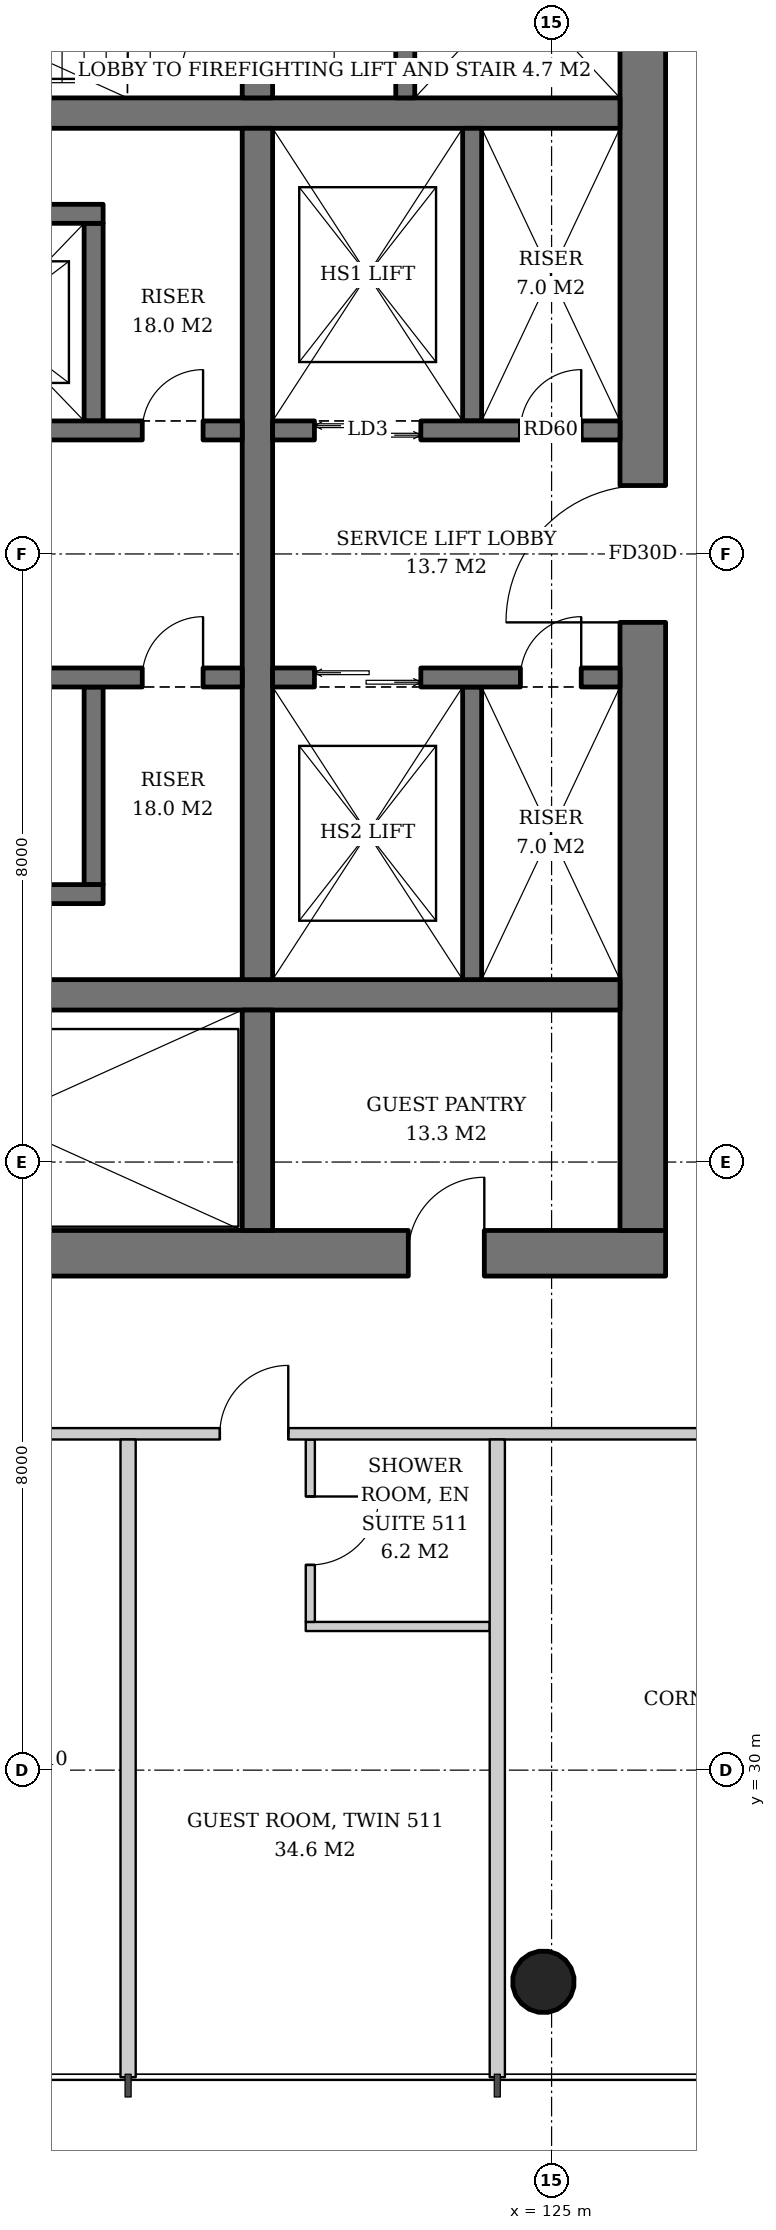
"""IFC4 building model, lengths in metres.
Left out: names, types, materials, properties, quantities, classifications, styles, units other than length and angle.
Written with IfcOpenShell. Run it as: python <this file> out.ifc"""

import sys

from ifc_helpers import new_model, si_unit, direction, frame, frame_2d, origin, origin_2d, place, context, subcontext, project, spatial, rectangle, hollow_circle, extrude, element, fill, save


model = new_model("IFC4")
c1 = context("Model", 3, precision=1e-05, world=origin(), true_north=direction((0.0, 1.0)))
c2 = subcontext(c1, "Body", "Model", "MODEL_VIEW")
j1 = project(units=[si_unit("LENGTHUNIT", "METRE"), si_unit("PLANEANGLEUNIT", "RADIAN")], contexts=[c1])
p1 = place(None, origin())
s1 = spatial("IfcSite", under=j1, at=p1, CompositionType="ELEMENT")
p2 = place(p1, origin())
s2 = spatial("IfcBuilding", under=s1, at=p2, CompositionType="ELEMENT")
p3 = place(p2, frame((0.0, 0.0, 24.8)))
s3 = spatial("IfcBuildingStorey", under=s2, at=p3, CompositionType="ELEMENT", Elevation=24.8)
p4 = place(p3, frame((124.918, 27.164, 0.0), z_axis=(-0.021561848751, 0.043059525333, 0.998839808957), x_axis=(-0.894160516368, -0.44774654769, 0.0)))
e1 = element("IfcColumn", 1, at=p4, inside=s3, PredefinedType="COLUMN", context=c2, shape_type="SweptSolid", body=[
    extrude(hollow_circle(Radius=0.406, WallThickness=0.03, at=origin_2d()), origin(), (0.0, 0.0, 1.0), 3.804),
])
p5 = place(p3, frame((107.5, 36.8, 0.0), z_axis=(0.0, 0.0, 1.0), x_axis=(1.0, 0.0, 0.0)))
e2 = element("IfcWall", 2, at=p5, inside=s3, PredefinedType="SHEAR", context=c2, shape_type="SweptSolid", body=[
    extrude(rectangle(XDim=19.0, YDim=0.6, at=frame_2d((9.5, 0.0))), origin(), (0.0, 0.0, 1.0), 3.8),
])
p6 = place(p5, frame((3.9, 0.0, 0.0)))
e3 = element("IfcOpeningElement", 3, at=p6, cuts=e2, PredefinedType="OPENING", context=c2, shape_type="SweptSolid", body=[
    extrude(rectangle(XDim=1.0, YDim=2.1, at=frame_2d((0.5, 1.05))), frame((0.0, 0.31, 0.0), z_axis=(0.0, -1.0, 0.0), x_axis=(1.0, 0.0, 0.0)), (0.0, 0.0, 1.0), 0.62),
])
p7 = place(p5, frame((15.615, 0.0, 0.0)))
e4 = element("IfcOpeningElement", 4, at=p7, cuts=e2, PredefinedType="OPENING", context=c2, shape_type="SweptSolid", body=[
    extrude(rectangle(XDim=1.0, YDim=2.1, at=frame_2d((0.5, 1.05))), frame((0.0, 0.31, 0.0), z_axis=(0.0, -1.0, 0.0), x_axis=(1.0, 0.0, 0.0)), (0.0, 0.0, 1.0), 0.62),
])
p8 = place(p3, frame((126.2, 37.1, 0.0), z_axis=(0.0, 0.0, 1.0), x_axis=(0.0, 1.0, 0.0)))
e5 = element("IfcWall", 5, at=p8, inside=s3, PredefinedType="SHEAR", context=c2, shape_type="SweptSolid", body=[
    extrude(rectangle(XDim=17.8, YDim=0.6, at=frame_2d((8.9, 0.0))), origin(), (0.0, 0.0, 1.0), 3.8),
])
p9 = place(p8, frame((8.0, 0.0, 0.0)))
e6 = element("IfcOpeningElement", 6, at=p9, cuts=e5, PredefinedType="OPENING", context=c2, shape_type="SweptSolid", body=[
    extrude(rectangle(XDim=1.8, YDim=2.4, at=frame_2d((0.9, 1.2))), frame((0.0, 0.31, 0.0), z_axis=(0.0, -1.0, 0.0), x_axis=(1.0, 0.0, 0.0)), (0.0, 0.0, 1.0), 0.62),
])
for number, where, z_axis, x_axis in (
    (7, (108.1, 40.2, 0.0), (0.0, 0.0, 1.0), (1.0, 0.0, 0.0)),
    (8, (108.1, 51.8, 0.0), (0.0, 0.0, 1.0), (1.0, 0.0, 0.0)),
):
    element("IfcWall", number, at=place(p3, frame(where, z_axis=z_axis, x_axis=x_axis)), inside=s3, PredefinedType="SHEAR", context=c2, shape_type="SweptSolid", body=[
        extrude(rectangle(XDim=17.8, YDim=0.4, at=frame_2d((8.9, 0.0))), origin(), (0.0, 0.0, 1.0), 3.8),
    ])
p10 = place(p3, frame((121.13, 37.1, 0.0), z_axis=(0.0, 0.0, 1.0), x_axis=(0.0, 1.0, 0.0)))
e9 = element("IfcWall", 9, at=p10, inside=s3, PredefinedType="SHEAR", context=c2, shape_type="SweptSolid", body=[
    extrude(rectangle(XDim=2.9, YDim=0.4, at=frame_2d((1.45, 0.0))), origin(), (0.0, 0.0, 1.0), 3.8),
])
p11 = place(p3, frame((121.13, 40.4, 0.0), z_axis=(0.0, 0.0, 1.0), x_axis=(0.0, 1.0, 0.0)))
e10 = element("IfcWall", 10, at=p11, inside=s3, PredefinedType="SHEAR", context=c2, shape_type="SweptSolid", body=[
    extrude(rectangle(XDim=11.2, YDim=0.4, at=frame_2d((5.6, 0.0))), origin(), (0.0, 0.0, 1.0), 3.8),
])
p12 = place(p3, frame((121.13, 52.0, 0.0), z_axis=(0.0, 0.0, 1.0), x_axis=(0.0, 1.0, 0.0)))
e11 = element("IfcWall", 11, at=p12, inside=s3, PredefinedType="SHEAR", context=c2, shape_type="SweptSolid", body=[
    extrude(rectangle(XDim=2.9, YDim=0.4, at=frame_2d((1.45, 0.0))), origin(), (0.0, 0.0, 1.0), 3.8),
])
p13 = place(p12, frame((0.3, 0.0, 0.0)))
e12 = element("IfcOpeningElement", 12, at=p13, cuts=e11, PredefinedType="OPENING", context=c2, shape_type="SweptSolid", body=[
    extrude(rectangle(XDim=1.0, YDim=2.1, at=frame_2d((0.5, 1.05))), frame((0.0, 0.21, 0.0), z_axis=(0.0, -1.0, 0.0), x_axis=(1.0, 0.0, 0.0)), (0.0, 0.0, 1.0), 0.42),
])
p14 = place(p3, frame((123.075, 52.0, 0.0), z_axis=(0.0, 0.0, 1.0), x_axis=(0.0, 1.0, 0.0)))
e13 = element("IfcWall", 13, at=p14, inside=s3, PredefinedType="SHEAR", context=c2, shape_type="SweptSolid", body=[
    extrude(rectangle(XDim=2.9, YDim=0.25, at=frame_2d((1.45, 0.0))), origin(), (0.0, 0.0, 1.0), 3.8),
])
p15 = place(p14, frame((0.8, 0.0, 0.0)))
e14 = element("IfcOpeningElement", 14, at=p15, cuts=e13, PredefinedType="OPENING", context=c2, shape_type="SweptSolid", body=[
    extrude(rectangle(XDim=1.3, YDim=2.2, at=frame_2d((0.65, 1.1))), frame((0.0, 0.135, 0.0), z_axis=(0.0, -1.0, 0.0), x_axis=(1.0, 0.0, 0.0)), (0.0, 0.0, 1.0), 0.27),
])
p16 = place(p3, frame((118.975, 47.75, 0.0), z_axis=(0.0, 0.0, 1.0), x_axis=(0.0, 1.0, 0.0)))
e15 = element("IfcWall", 15, at=p16, inside=s3, PredefinedType="SHEAR", context=c2, shape_type="SweptSolid", body=[
    extrude(rectangle(XDim=2.6, YDim=0.25, at=frame_2d((1.3, 0.0))), origin(), (0.0, 0.0, 1.0), 3.8),
])
p17 = place(p3, frame((108.1, 50.475, 0.0), z_axis=(0.0, 0.0, 1.0), x_axis=(1.0, 0.0, 0.0)))
e16 = element("IfcWall", 16, at=p17, inside=s3, PredefinedType="SHEAR", context=c2, shape_type="SweptSolid", body=[
    extrude(rectangle(XDim=11.0, YDim=0.25, at=frame_2d((5.5, 0.0))), origin(), (0.0, 0.0, 1.0), 3.8),
])
p18 = place(p3, frame((108.1, 47.625, 0.0), z_axis=(0.0, 0.0, 1.0), x_axis=(1.0, 0.0, 0.0)))
e17 = element("IfcWall", 17, at=p18, inside=s3, PredefinedType="SHEAR", context=c2, shape_type="SweptSolid", body=[
    extrude(rectangle(XDim=12.83, YDim=0.25, at=frame_2d((6.415, 0.0))), origin(), (0.0, 0.0, 1.0), 3.8),
])
p19 = place(p18, frame((0.7, 0.0, 0.0)))
e18 = element("IfcOpeningElement", 18, at=p19, cuts=e17, PredefinedType="OPENING", context=c2, shape_type="SweptSolid", body=[
    extrude(rectangle(XDim=1.1, YDim=2.2, at=frame_2d((0.55, 1.1))), frame((0.0, 0.135, 0.0), z_axis=(0.0, -1.0, 0.0), x_axis=(1.0, 0.0, 0.0)), (0.0, 0.0, 1.0), 0.27),
])
p20 = place(p18, frame((3.45, 0.0, 0.0)))
e19 = element("IfcOpeningElement", 19, at=p20, cuts=e17, PredefinedType="OPENING", context=c2, shape_type="SweptSolid", body=[
    extrude(rectangle(XDim=1.1, YDim=2.2, at=frame_2d((0.55, 1.1))), frame((0.0, 0.135, 0.0), z_axis=(0.0, -1.0, 0.0), x_axis=(1.0, 0.0, 0.0)), (0.0, 0.0, 1.0), 0.27),
])
p21 = place(p18, frame((6.2, 0.0, 0.0)))
e20 = element("IfcOpeningElement", 20, at=p21, cuts=e17, PredefinedType="OPENING", context=c2, shape_type="SweptSolid", body=[
    extrude(rectangle(XDim=1.1, YDim=2.2, at=frame_2d((0.55, 1.1))), frame((0.0, 0.135, 0.0), z_axis=(0.0, -1.0, 0.0), x_axis=(1.0, 0.0, 0.0)), (0.0, 0.0, 1.0), 0.27),
])
p22 = place(p18, frame((8.95, 0.0, 0.0)))
e21 = element("IfcOpeningElement", 21, at=p22, cuts=e17, PredefinedType="OPENING", context=c2, shape_type="SweptSolid", body=[
    extrude(rectangle(XDim=1.1, YDim=2.2, at=frame_2d((0.55, 1.1))), frame((0.0, 0.135, 0.0), z_axis=(0.0, -1.0, 0.0), x_axis=(1.0, 0.0, 0.0)), (0.0, 0.0, 1.0), 0.27),
])
p23 = place(p18, frame((11.515, 0.0, 0.0)))
e22 = element("IfcOpeningElement", 22, at=p23, cuts=e17, PredefinedType="OPENING", context=c2, shape_type="SweptSolid", body=[
    extrude(rectangle(XDim=0.8, YDim=2.0, at=frame_2d((0.4, 1.0))), frame((0.0, 0.135, 0.0), z_axis=(0.0, -1.0, 0.0), x_axis=(1.0, 0.0, 0.0)), (0.0, 0.0, 1.0), 0.27),
])
p24 = place(p3, frame((118.975, 44.25, 0.0), z_axis=(0.0, 0.0, 1.0), x_axis=(0.0, -1.0, 0.0)))
e23 = element("IfcWall", 23, at=p24, inside=s3, PredefinedType="SHEAR", context=c2, shape_type="SweptSolid", body=[
    extrude(rectangle(XDim=2.6, YDim=0.25, at=frame_2d((1.3, 0.0))), origin(), (0.0, 0.0, 1.0), 3.8),
])
p25 = place(p3, frame((108.1, 41.525, 0.0), z_axis=(0.0, 0.0, 1.0), x_axis=(1.0, 0.0, 0.0)))
e24 = element("IfcWall", 24, at=p25, inside=s3, PredefinedType="SHEAR", context=c2, shape_type="SweptSolid", body=[
    extrude(rectangle(XDim=11.0, YDim=0.25, at=frame_2d((5.5, 0.0))), origin(), (0.0, 0.0, 1.0), 3.8),
])
p26 = place(p3, frame((108.1, 44.375, 0.0), z_axis=(0.0, 0.0, 1.0), x_axis=(1.0, 0.0, 0.0)))
e25 = element("IfcWall", 25, at=p26, inside=s3, PredefinedType="SHEAR", context=c2, shape_type="SweptSolid", body=[
    extrude(rectangle(XDim=12.83, YDim=0.25, at=frame_2d((6.415, 0.0))), origin(), (0.0, 0.0, 1.0), 3.8),
])
p27 = place(p26, frame((0.7, 0.0, 0.0)))
e26 = element("IfcOpeningElement", 26, at=p27, cuts=e25, PredefinedType="OPENING", context=c2, shape_type="SweptSolid", body=[
    extrude(rectangle(XDim=1.1, YDim=2.2, at=frame_2d((0.55, 1.1))), frame((0.0, 0.135, 0.0), z_axis=(0.0, -1.0, 0.0), x_axis=(1.0, 0.0, 0.0)), (0.0, 0.0, 1.0), 0.27),
])
p28 = place(p26, frame((3.45, 0.0, 0.0)))
e27 = element("IfcOpeningElement", 27, at=p28, cuts=e25, PredefinedType="OPENING", context=c2, shape_type="SweptSolid", body=[
    extrude(rectangle(XDim=1.1, YDim=2.2, at=frame_2d((0.55, 1.1))), frame((0.0, 0.135, 0.0), z_axis=(0.0, -1.0, 0.0), x_axis=(1.0, 0.0, 0.0)), (0.0, 0.0, 1.0), 0.27),
])
p29 = place(p26, frame((6.2, 0.0, 0.0)))
e28 = element("IfcOpeningElement", 28, at=p29, cuts=e25, PredefinedType="OPENING", context=c2, shape_type="SweptSolid", body=[
    extrude(rectangle(XDim=1.1, YDim=2.2, at=frame_2d((0.55, 1.1))), frame((0.0, 0.135, 0.0), z_axis=(0.0, -1.0, 0.0), x_axis=(1.0, 0.0, 0.0)), (0.0, 0.0, 1.0), 0.27),
])
p30 = place(p26, frame((9.0, 0.0, 0.0)))
e29 = element("IfcOpeningElement", 29, at=p30, cuts=e25, PredefinedType="OPENING", context=c2, shape_type="SweptSolid", body=[
    extrude(rectangle(XDim=1.0, YDim=2.1, at=frame_2d((0.5, 1.05))), frame((0.0, 0.135, 0.0), z_axis=(0.0, -1.0, 0.0), x_axis=(1.0, 0.0, 0.0)), (0.0, 0.0, 1.0), 0.27),
])
p31 = place(p26, frame((11.515, 0.0, 0.0)))
e30 = element("IfcOpeningElement", 30, at=p31, cuts=e25, PredefinedType="OPENING", context=c2, shape_type="SweptSolid", body=[
    extrude(rectangle(XDim=0.8, YDim=2.0, at=frame_2d((0.4, 1.0))), frame((0.0, 0.135, 0.0), z_axis=(0.0, -1.0, 0.0), x_axis=(1.0, 0.0, 0.0)), (0.0, 0.0, 1.0), 0.27),
])
p32 = place(p3, frame((123.955, 47.75, 0.0), z_axis=(0.0, 0.0, 1.0), x_axis=(0.0, 1.0, 0.0)))
e31 = element("IfcWall", 31, at=p32, inside=s3, PredefinedType="SHEAR", context=c2, shape_type="SweptSolid", body=[
    extrude(rectangle(XDim=3.85, YDim=0.25, at=frame_2d((1.925, 0.0))), origin(), (0.0, 0.0, 1.0), 3.8),
])
p33 = place(p3, frame((121.33, 47.625, 0.0), z_axis=(0.0, 0.0, 1.0), x_axis=(1.0, 0.0, 0.0)))
e32 = element("IfcWall", 32, at=p33, inside=s3, PredefinedType="SHEAR", context=c2, shape_type="SweptSolid", body=[
    extrude(rectangle(XDim=4.57, YDim=0.25, at=frame_2d((2.285, 0.0))), origin(), (0.0, 0.0, 1.0), 3.8),
])
p34 = place(p33, frame((0.55, 0.0, 0.0)))
e33 = element("IfcOpeningElement", 33, at=p34, cuts=e32, PredefinedType="OPENING", context=c2, shape_type="SweptSolid", body=[
    extrude(rectangle(XDim=1.4, YDim=2.4, at=frame_2d((0.7, 1.2))), frame((0.0, 0.135, 0.0), z_axis=(0.0, -1.0, 0.0), x_axis=(1.0, 0.0, 0.0)), (0.0, 0.0, 1.0), 0.27),
])
p35 = place(p33, frame((3.26, 0.0, 0.0)))
e34 = element("IfcOpeningElement", 34, at=p35, cuts=e32, PredefinedType="OPENING", context=c2, shape_type="SweptSolid", body=[
    extrude(rectangle(XDim=0.8, YDim=2.0, at=frame_2d((0.4, 1.0))), frame((0.0, 0.135, 0.0), z_axis=(0.0, -1.0, 0.0), x_axis=(1.0, 0.0, 0.0)), (0.0, 0.0, 1.0), 0.27),
])
p36 = place(p3, frame((123.955, 44.25, 0.0), z_axis=(0.0, 0.0, 1.0), x_axis=(0.0, -1.0, 0.0)))
e35 = element("IfcWall", 35, at=p36, inside=s3, PredefinedType="SHEAR", context=c2, shape_type="SweptSolid", body=[
    extrude(rectangle(XDim=3.85, YDim=0.25, at=frame_2d((1.925, 0.0))), origin(), (0.0, 0.0, 1.0), 3.8),
])
p37 = place(p3, frame((121.33, 44.375, 0.0), z_axis=(0.0, 0.0, 1.0), x_axis=(1.0, 0.0, 0.0)))
e36 = element("IfcWall", 36, at=p37, inside=s3, PredefinedType="SHEAR", context=c2, shape_type="SweptSolid", body=[
    extrude(rectangle(XDim=4.57, YDim=0.25, at=frame_2d((2.285, 0.0))), origin(), (0.0, 0.0, 1.0), 3.8),
])
p38 = place(p37, frame((0.55, 0.0, 0.0)))
e37 = element("IfcOpeningElement", 37, at=p38, cuts=e36, PredefinedType="OPENING", context=c2, shape_type="SweptSolid", body=[
    extrude(rectangle(XDim=1.4, YDim=2.4, at=frame_2d((0.7, 1.2))), frame((0.0, 0.135, 0.0), z_axis=(0.0, -1.0, 0.0), x_axis=(1.0, 0.0, 0.0)), (0.0, 0.0, 1.0), 0.27),
])
p39 = place(p37, frame((3.26, 0.0, 0.0)))
e38 = element("IfcOpeningElement", 38, at=p39, cuts=e36, PredefinedType="OPENING", context=c2, shape_type="SweptSolid", body=[
    extrude(rectangle(XDim=0.8, YDim=2.0, at=frame_2d((0.4, 1.0))), frame((0.0, 0.135, 0.0), z_axis=(0.0, -1.0, 0.0), x_axis=(1.0, 0.0, 0.0)), (0.0, 0.0, 1.0), 0.27),
])
p40 = place(p3, frame((121.766, 31.89, 0.0), z_axis=(0.0, 0.0, 1.0), x_axis=(1.0, 0.0, 0.0)))
e39 = element("IfcWall", 39, at=p40, inside=s3, PredefinedType="PARTITIONING", context=c2, shape_type="SweptSolid", body=[
    extrude(rectangle(XDim=2.42, YDim=0.12, at=frame_2d((1.21, 0.0))), origin(), (0.0, 0.0, 1.0), 2.847),
])
p41 = place(p3, frame((121.826, 34.35, 0.0), z_axis=(0.0, 0.0, 1.0), x_axis=(0.0, -1.0, 0.0)))
e40 = element("IfcWall", 40, at=p41, inside=s3, PredefinedType="PARTITIONING", context=c2, shape_type="SweptSolid", body=[
    extrude(rectangle(XDim=2.4, YDim=0.12, at=frame_2d((1.2, 0.0))), origin(), (0.0, 0.0, 1.0), 3.6),
])
p42 = place(p41, frame((0.75, 0.0, 0.0)))
e41 = element("IfcOpeningElement", 41, at=p42, cuts=e40, PredefinedType="OPENING", context=c2, shape_type="SweptSolid", body=[
    extrude(rectangle(XDim=0.9, YDim=2.1, at=frame_2d((0.45, 1.05))), frame((0.0, 0.07, 0.0), z_axis=(0.0, -1.0, 0.0), x_axis=(1.0, 0.0, 0.0)), (0.0, 0.0, 1.0), 0.14),
])
p43 = place(p3, frame((105.35, 34.425, 0.0), z_axis=(0.0, 0.0, 1.0), x_axis=(1.0, 0.0, 0.0)))
e42 = element("IfcWall", 42, at=p43, inside=s3, PredefinedType="PARTITIONING", context=c2, shape_type="SweptSolid", body=[
    extrude(rectangle(XDim=23.15, YDim=0.15, at=frame_2d((11.575, 0.0))), origin(), (0.0, 0.0, 1.0), 2.8),
])
p44 = place(p43, frame((1.757, 0.0, 0.0)))
e43 = element("IfcOpeningElement", 43, at=p44, cuts=e42, PredefinedType="OPENING", context=c2, shape_type="SweptSolid", body=[
    extrude(rectangle(XDim=0.9, YDim=2.1, at=frame_2d((0.45, 1.05))), frame((0.0, 0.085, 0.0), z_axis=(0.0, -1.0, 0.0), x_axis=(1.0, 0.0, 0.0)), (0.0, 0.0, 1.0), 0.17),
])
p45 = place(p43, frame((11.971, 0.0, 0.0)))
e44 = element("IfcOpeningElement", 44, at=p45, cuts=e42, PredefinedType="OPENING", context=c2, shape_type="SweptSolid", body=[
    extrude(rectangle(XDim=0.9, YDim=2.1, at=frame_2d((0.45, 1.05))), frame((0.0, 0.085, 0.0), z_axis=(0.0, -1.0, 0.0), x_axis=(1.0, 0.0, 0.0)), (0.0, 0.0, 1.0), 0.17),
])
p46 = place(p43, frame((15.286, 0.0, 0.0)))
e45 = element("IfcOpeningElement", 45, at=p46, cuts=e42, PredefinedType="OPENING", context=c2, shape_type="SweptSolid", body=[
    extrude(rectangle(XDim=0.9, YDim=2.1, at=frame_2d((0.45, 1.05))), frame((0.0, 0.085, 0.0), z_axis=(0.0, -1.0, 0.0), x_axis=(1.0, 0.0, 0.0)), (0.0, 0.0, 1.0), 0.17),
])
for number, where, z_axis, x_axis in (
    (46, (119.428, 34.35, 0.0), (0.0, 0.0, 1.0), (0.0, -1.0, 0.0)),
    (47, (124.286, 34.35, 0.0), (0.0, 0.0, 1.0), (0.0, -1.0, 0.0)),
):
    element("IfcWall", number, at=place(p3, frame(where, z_axis=z_axis, x_axis=x_axis)), inside=s3, PredefinedType="PARTITIONING", context=c2, shape_type="SweptSolid", body=[
        extrude(rectangle(XDim=8.39, YDim=0.2, at=frame_2d((4.195, 0.0))), origin(), (0.0, 0.0, 1.0), 3.05),
    ])
p47 = place(p23, origin())
e48 = element("IfcDoor", 48, at=p47, inside=s3, OperationType="SINGLE_SWING_RIGHT", PredefinedType="DOOR", context=c2, shape_type="SweptSolid", body=[
    extrude(rectangle(XDim=0.8, YDim=2.0, at=frame_2d((0.4, 1.0))), frame((0.0, 0.025, 0.0), z_axis=(0.0, -1.0, 0.0), x_axis=(1.0, 0.0, 0.0)), (0.0, 0.0, 1.0), 0.05),
])
fill(e22, e48)
p48 = place(p31, origin())
e49 = element("IfcDoor", 49, at=p48, inside=s3, OperationType="SINGLE_SWING_RIGHT", PredefinedType="DOOR", context=c2, shape_type="SweptSolid", body=[
    extrude(rectangle(XDim=0.8, YDim=2.0, at=frame_2d((0.4, 1.0))), frame((0.0, 0.025, 0.0), z_axis=(0.0, -1.0, 0.0), x_axis=(1.0, 0.0, 0.0)), (0.0, 0.0, 1.0), 0.05),
])
fill(e30, e49)
p49 = place(p34, origin())
e50 = element("IfcDoor", 50, at=p49, inside=s3, OperationType="DOUBLE_DOOR_SLIDING", PredefinedType="DOOR", context=c2, shape_type="SweptSolid", body=[
    extrude(rectangle(XDim=1.4, YDim=2.4, at=frame_2d((0.7, 1.2))), frame((0.0, 0.025, 0.0), z_axis=(0.0, -1.0, 0.0), x_axis=(1.0, 0.0, 0.0)), (0.0, 0.0, 1.0), 0.05),
])
fill(e33, e50)
p50 = place(p35, origin())
e51 = element("IfcDoor", 51, at=p50, inside=s3, OperationType="SINGLE_SWING_RIGHT", PredefinedType="DOOR", context=c2, shape_type="SweptSolid", body=[
    extrude(rectangle(XDim=0.8, YDim=2.0, at=frame_2d((0.4, 1.0))), frame((0.0, 0.025, 0.0), z_axis=(0.0, -1.0, 0.0), x_axis=(1.0, 0.0, 0.0)), (0.0, 0.0, 1.0), 0.05),
])
fill(e34, e51)
p51 = place(p38, origin())
e52 = element("IfcDoor", 52, at=p51, inside=s3, OperationType="DOUBLE_DOOR_SLIDING", PredefinedType="DOOR", context=c2, shape_type="SweptSolid", body=[
    extrude(rectangle(XDim=1.4, YDim=2.4, at=frame_2d((0.7, 1.2))), frame((0.0, 0.025, 0.0), z_axis=(0.0, -1.0, 0.0), x_axis=(1.0, 0.0, 0.0)), (0.0, 0.0, 1.0), 0.05),
])
fill(e37, e52)
p52 = place(p39, origin())
e53 = element("IfcDoor", 53, at=p52, inside=s3, OperationType="SINGLE_SWING_RIGHT", PredefinedType="DOOR", context=c2, shape_type="SweptSolid", body=[
    extrude(rectangle(XDim=0.8, YDim=2.0, at=frame_2d((0.4, 1.0))), frame((0.0, 0.025, 0.0), z_axis=(0.0, -1.0, 0.0), x_axis=(1.0, 0.0, 0.0)), (0.0, 0.0, 1.0), 0.05),
])
fill(e38, e53)
p53 = place(p13, origin())
e54 = element("IfcDoor", 54, at=p53, inside=s3, OperationType="SINGLE_SWING_LEFT", PredefinedType="DOOR", context=c2, shape_type="SweptSolid", body=[
    extrude(rectangle(XDim=1.0, YDim=2.1, at=frame_2d((0.5, 1.05))), frame((0.0, 0.025, 0.0), z_axis=(0.0, -1.0, 0.0), x_axis=(1.0, 0.0, 0.0)), (0.0, 0.0, 1.0), 0.05),
])
fill(e12, e54)
p54 = place(p9, origin())
e55 = element("IfcDoor", 55, at=p54, inside=s3, OperationType="DOUBLE_DOOR_SINGLE_SWING", PredefinedType="DOOR", context=c2, shape_type="SweptSolid", body=[
    extrude(rectangle(XDim=1.8, YDim=2.4, at=frame_2d((0.9, 1.2))), frame((0.0, 0.025, 0.0), z_axis=(0.0, -1.0, 0.0), x_axis=(1.0, 0.0, 0.0)), (0.0, 0.0, 1.0), 0.05),
])
fill(e6, e55)
p55 = place(p7, origin())
e56 = element("IfcDoor", 56, at=p55, inside=s3, OperationType="SINGLE_SWING_RIGHT", PredefinedType="DOOR", context=c2, shape_type="SweptSolid", body=[
    extrude(rectangle(XDim=1.0, YDim=2.1, at=frame_2d((0.5, 1.05))), frame((0.0, 0.29, 0.0), z_axis=(0.0, -1.0, 0.0), x_axis=(1.0, 0.0, 0.0)), (0.0, 0.0, 1.0), 0.05),
])
fill(e4, e56)
p56 = place(p42, origin())
e57 = element("IfcDoor", 57, at=p56, inside=s3, OperationType="SINGLE_SWING_LEFT", PredefinedType="DOOR", context=c2, shape_type="SweptSolid", body=[
    extrude(rectangle(XDim=0.9, YDim=2.1, at=frame_2d((0.45, 1.05))), frame((0.0, 0.025, 0.0), z_axis=(0.0, -1.0, 0.0), x_axis=(1.0, 0.0, 0.0)), (0.0, 0.0, 1.0), 0.05),
])
fill(e41, e57)
p57 = place(p46, origin())
e58 = element("IfcDoor", 58, at=p57, inside=s3, OperationType="SINGLE_SWING_RIGHT", PredefinedType="DOOR", context=c2, shape_type="SweptSolid", body=[
    extrude(rectangle(XDim=0.9, YDim=2.1, at=frame_2d((0.45, 1.05))), frame((0.0, 0.025, 0.0), z_axis=(0.0, -1.0, 0.0), x_axis=(1.0, 0.0, 0.0)), (0.0, 0.0, 1.0), 0.05),
])
fill(e45, e58)
save(model, sys.argv[1])
